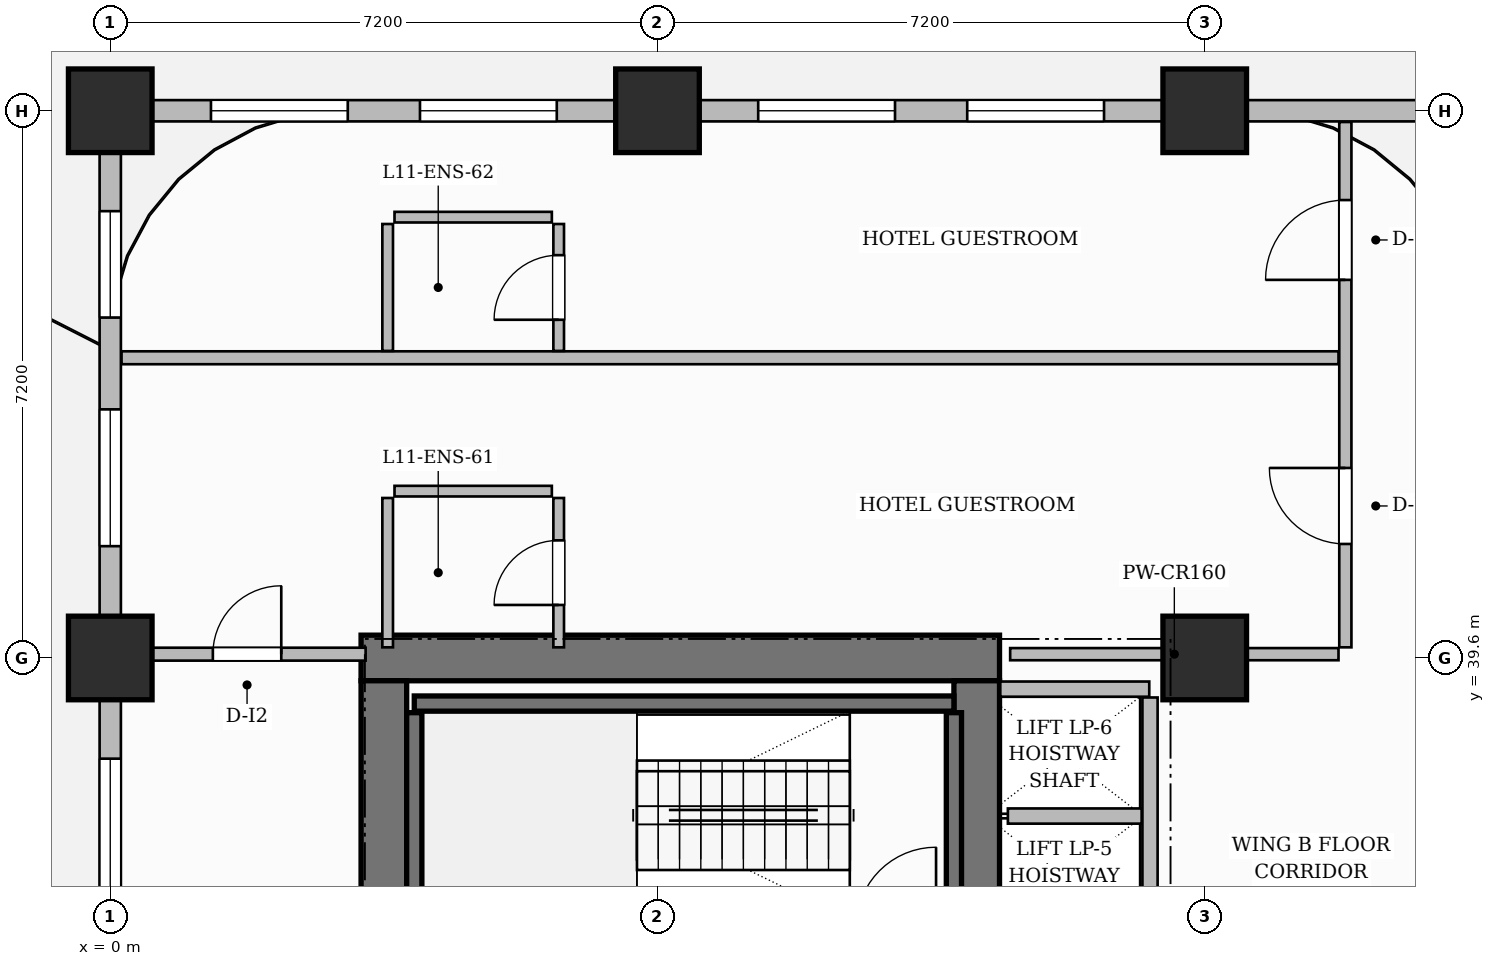
"""IFC4 building model, lengths in metres.
Left out: names, types, materials, properties, quantities, classifications, styles, units other than length and angle.
Written with IfcOpenShell. Run it as: python <this file> out.ifc"""

import sys

from ifc_helpers import new_model, si_unit, direction, frame, frame_2d, origin, origin_2d, place, context, subcontext, project, spatial, rectangle, extrude, source, transform, mapped, element, fill, save


model = new_model("IFC4")
c1 = context("Model", 3, precision=1e-05, world=origin(), true_north=direction((0.0, 1.0)))
c2 = subcontext(c1, "Body", "Model", "MODEL_VIEW")
j1 = project(units=[si_unit("LENGTHUNIT", "METRE"), si_unit("PLANEANGLEUNIT", "RADIAN")], contexts=[c1])
p1 = place(None, origin())
s1 = spatial("IfcSite", under=j1, at=p1, CompositionType="ELEMENT")
p2 = place(p1, origin())
s2 = spatial("IfcBuilding", under=s1, at=p2, CompositionType="ELEMENT")
p3 = place(p2, frame((0.0, 0.0, 50.9)))
s3 = spatial("IfcBuildingStorey", under=s2, at=p3, CompositionType="ELEMENT", Elevation=50.9)
p4 = place(p3, frame((3.3, 39.6, 0.0), z_axis=(0.0, 0.0, 1.0), x_axis=(1.0, 0.0, 0.0)))
e1 = element("IfcWall", 1, at=p4, inside=s3, PredefinedType="SHEAR", context=c2, shape_type="SweptSolid", body=[
    extrude(rectangle(XDim=8.4, YDim=0.6, at=frame_2d((4.2, 0.0))), origin(), (0.0, 0.0, 1.0), 3.7),
])
p5 = place(p3, frame((3.6, 25.5, 0.0), z_axis=(0.0, 0.0, 1.0), x_axis=(0.0, 1.0, 0.0)))
e2 = element("IfcWall", 2, at=p5, inside=s3, PredefinedType="SHEAR", context=c2, shape_type="SweptSolid", body=[
    extrude(rectangle(XDim=13.8, YDim=0.6, at=frame_2d((6.9, 0.0))), origin(), (0.0, 0.0, 1.0), 3.7),
])
p6 = place(p3, frame((11.4, 25.5, 0.0), z_axis=(0.0, 0.0, 1.0), x_axis=(0.0, 1.0, 0.0)))
e3 = element("IfcWall", 3, at=p6, inside=s3, PredefinedType="SHEAR", context=c2, shape_type="SweptSolid", body=[
    extrude(rectangle(XDim=13.8, YDim=0.6, at=frame_2d((6.9, 0.0))), origin(), (0.0, 0.0, 1.0), 3.7),
])
p7 = place(p6, frame((6.47, 0.0, 0.0)))
e4 = element("IfcOpeningElement", 4, at=p7, cuts=e3, PredefinedType="OPENING", context=c2, shape_type="SweptSolid", body=[
    extrude(rectangle(XDim=1.5, YDim=2.2, at=frame_2d((0.75, 1.1))), frame((0.0, 0.31, 0.0), z_axis=(0.0, -1.0, 0.0), x_axis=(1.0, 0.0, 0.0)), (0.0, 0.0, 1.0), 0.62),
])
m1 = source(origin(), c2, "Body", "SweptSolid", [
    extrude(rectangle(XDim=1.1, YDim=1.1, at=origin_2d()), origin(), (0.0, 0.0, 1.0), 3.7),
])
for number, where, z_axis, x_axis in (
    (5, (0.0, 39.6, 0.0), (0.0, 0.0, 1.0), (1.0, 0.0, 0.0)),
    (6, (0.0, 46.8, 0.0), (0.0, 0.0, 1.0), (1.0, 0.0, 0.0)),
    (7, (7.2, 46.8, 0.0), (0.0, 0.0, 1.0), (1.0, 0.0, 0.0)),
    (8, (14.4, 39.6, 0.0), (0.0, 0.0, 1.0), (1.0, 0.0, 0.0)),
    (9, (14.4, 46.8, 0.0), (0.0, 0.0, 1.0), (1.0, 0.0, 0.0)),
):
    element("IfcColumn", number, at=place(p3, frame(where, z_axis=z_axis, x_axis=x_axis)), inside=s3, PredefinedType="COLUMN", context=c2, shape_type="MappedRepresentation", body=[
        mapped(m1, transform((0.0, 0.0, 0.0), scale=1.0)),
    ])
p8 = place(p3, frame((4.0, 39.0, 0.0), z_axis=(0.0, 0.0, 1.0), x_axis=(1.0, 0.0, 0.0)))
e10 = element("IfcWall", 10, at=p8, inside=s3, PredefinedType="SHEAR", context=c2, shape_type="SweptSolid", body=[
    extrude(rectangle(XDim=7.1, YDim=0.2, at=frame_2d((3.55, 0.0))), origin(), (0.0, 0.0, 1.0), 3.7),
])
for number, where, z_axis, x_axis in (
    (11, (4.0, 36.18, 0.0), (0.0, 0.0, 1.0), (0.0, 1.0, 0.0)),
    (12, (11.1, 36.18, 0.0), (0.0, 0.0, 1.0), (0.0, 1.0, 0.0)),
):
    element("IfcWall", number, at=place(p3, frame(where, z_axis=z_axis, x_axis=x_axis)), inside=s3, PredefinedType="SHEAR", context=c2, shape_type="SweptSolid", body=[
        extrude(rectangle(XDim=2.7, YDim=0.2, at=frame_2d((1.35, 0.0))), origin(), (0.0, 0.0, 1.0), 3.7),
    ])
p9 = place(p3, frame((11.71, 39.19, 0.0), z_axis=(0.0, 0.0, 1.0), x_axis=(1.0, 0.0, 0.0)))
e13 = element("IfcWall", 13, at=p9, inside=s3, PredefinedType="PARTITIONING", context=c2, shape_type="SweptSolid", body=[
    extrude(rectangle(XDim=1.96, YDim=0.2, at=frame_2d((0.98, 0.0))), origin(), (0.0, 0.0, 1.0), 3.45),
])
p10 = place(p3, frame((13.68, 34.36, 0.0), z_axis=(0.0, 0.0, 1.0), x_axis=(0.0, 1.0, 0.0)))
e14 = element("IfcWall", 14, at=p10, inside=s3, PredefinedType="PARTITIONING", context=c2, shape_type="SweptSolid", body=[
    extrude(rectangle(XDim=4.72, YDim=0.2, at=frame_2d((2.36, 0.0))), origin(), (0.0, 0.0, 1.0), 3.45),
])
p11 = place(p3, frame((11.81, 37.52, 0.0), z_axis=(0.0, 0.0, 1.0), x_axis=(1.0, 0.0, 0.0)))
e15 = element("IfcWall", 15, at=p11, inside=s3, PredefinedType="PARTITIONING", context=c2, shape_type="SweptSolid", body=[
    extrude(rectangle(XDim=1.76, YDim=0.2, at=frame_2d((0.88, 0.0))), origin(), (0.0, 0.0, 1.0), 3.45),
])
p12 = place(p3, frame((16.25, 39.74, 0.0), z_axis=(0.0, 0.0, 1.0), x_axis=(0.0, 1.0, 0.0)))
e16 = element("IfcWall", 16, at=p12, inside=s3, PredefinedType="PARTITIONING", context=c2, shape_type="SweptSolid", body=[
    extrude(rectangle(XDim=6.912, YDim=0.16, at=frame_2d((3.456, 0.0))), origin(), (0.0, 0.0, 1.0), 3.45),
])
p13 = place(p12, frame((1.36, 0.0, 0.0)))
e17 = element("IfcOpeningElement", 17, at=p13, cuts=e16, PredefinedType="OPENING", context=c2, shape_type="SweptSolid", body=[
    extrude(rectangle(XDim=1.0, YDim=2.2, at=frame_2d((0.5, 1.1))), frame((0.0, 0.09, 0.0), z_axis=(0.0, -1.0, 0.0), x_axis=(1.0, 0.0, 0.0)), (0.0, 0.0, 1.0), 0.18),
])
p14 = place(p12, frame((4.835, 0.0, 0.0)))
e18 = element("IfcOpeningElement", 18, at=p14, cuts=e16, PredefinedType="OPENING", context=c2, shape_type="SweptSolid", body=[
    extrude(rectangle(XDim=1.05, YDim=2.25, at=frame_2d((0.525, 1.125))), frame((0.0, 0.09, 0.0), z_axis=(0.0, -1.0, 0.0), x_axis=(1.0, 0.0, 0.0)), (0.0, 0.0, 1.0), 0.18),
])
p15 = place(p3, frame((11.84, 39.65, 0.0), z_axis=(0.0, 0.0, 1.0), x_axis=(1.0, 0.0, 0.0)))
e19 = element("IfcWall", 19, at=p15, inside=s3, PredefinedType="PARTITIONING", context=c2, shape_type="SweptSolid", body=[
    extrude(rectangle(XDim=4.32, YDim=0.16, at=frame_2d((2.16, 0.0))), origin(), (0.0, 0.0, 1.0), 2.885),
])
p16 = place(p3, frame((0.24, 39.65, 0.0), z_axis=(0.0, 0.0, 1.0), x_axis=(1.0, 0.0, 0.0)))
e20 = element("IfcWall", 20, at=p16, inside=s3, PredefinedType="PARTITIONING", context=c2, shape_type="SweptSolid", body=[
    extrude(rectangle(XDim=3.12, YDim=0.17, at=frame_2d((1.56, 0.0))), origin(), (0.0, 0.0, 1.0), 3.45),
])
p17 = place(p16, frame((1.11, 0.0, 0.0)))
e21 = element("IfcOpeningElement", 21, at=p17, cuts=e20, PredefinedType="OPENING", context=c2, shape_type="SweptSolid", body=[
    extrude(rectangle(XDim=0.9, YDim=2.15, at=frame_2d((0.45, 1.075))), frame((0.0, 0.095, 0.0), z_axis=(0.0, -1.0, 0.0), x_axis=(1.0, 0.0, 0.0)), (0.0, 0.0, 1.0), 0.19),
])
p18 = place(p3, frame((0.148, 43.55, 0.0), z_axis=(0.0, 0.0, 1.0), x_axis=(1.0, 0.0, 0.0)))
e22 = element("IfcWall", 22, at=p18, inside=s3, PredefinedType="PARTITIONING", context=c2, shape_type="SweptSolid", body=[
    extrude(rectangle(XDim=16.012, YDim=0.17, at=frame_2d((8.006, 0.0))), origin(), (0.0, 0.0, 1.0), 3.45),
])
p19 = place(p3, frame((3.65, 39.74, 0.0), z_axis=(0.0, 0.0, 1.0), x_axis=(0.0, 1.0, 0.0)))
e23 = element("IfcWall", 23, at=p19, inside=s3, PredefinedType="PARTITIONING", context=c2, shape_type="SweptSolid", body=[
    extrude(rectangle(XDim=1.965, YDim=0.14, at=frame_2d((0.982, 0.0))), origin(), (0.0, 0.0, 1.0), 3.45),
])
p20 = place(p3, frame((3.74, 41.795, 0.0), z_axis=(0.0, 0.0, 1.0), x_axis=(1.0, 0.0, 0.0)))
e24 = element("IfcWall", 24, at=p20, inside=s3, PredefinedType="PARTITIONING", context=c2, shape_type="SweptSolid", body=[
    extrude(rectangle(XDim=2.07, YDim=0.14, at=frame_2d((1.035, 0.0))), origin(), (0.0, 0.0, 1.0), 2.885),
])
p21 = place(p3, frame((5.9, 39.74, 0.0), z_axis=(0.0, 0.0, 1.0), x_axis=(0.0, 1.0, 0.0)))
e25 = element("IfcWall", 25, at=p21, inside=s3, PredefinedType="PARTITIONING", context=c2, shape_type="SweptSolid", body=[
    extrude(rectangle(XDim=1.965, YDim=0.14, at=frame_2d((0.982, 0.0))), origin(), (0.0, 0.0, 1.0), 3.45),
])
p22 = place(p21, frame((0.558, 0.0, 0.0)))
e26 = element("IfcOpeningElement", 26, at=p22, cuts=e25, PredefinedType="OPENING", context=c2, shape_type="SweptSolid", body=[
    extrude(rectangle(XDim=0.85, YDim=2.1, at=frame_2d((0.425, 1.05))), frame((0.0, 0.08, 0.0), z_axis=(0.0, -1.0, 0.0), x_axis=(1.0, 0.0, 0.0)), (0.0, 0.0, 1.0), 0.16),
])
p23 = place(p3, frame((3.65, 43.64, 0.0), z_axis=(0.0, 0.0, 1.0), x_axis=(0.0, 1.0, 0.0)))
e27 = element("IfcWall", 27, at=p23, inside=s3, PredefinedType="PARTITIONING", context=c2, shape_type="SweptSolid", body=[
    extrude(rectangle(XDim=1.67, YDim=0.14, at=frame_2d((0.835, 0.0))), origin(), (0.0, 0.0, 1.0), 3.45),
])
p24 = place(p3, frame((3.74, 45.4, 0.0), z_axis=(0.0, 0.0, 1.0), x_axis=(1.0, 0.0, 0.0)))
e28 = element("IfcWall", 28, at=p24, inside=s3, PredefinedType="PARTITIONING", context=c2, shape_type="SweptSolid", body=[
    extrude(rectangle(XDim=2.07, YDim=0.14, at=frame_2d((1.035, 0.0))), origin(), (0.0, 0.0, 1.0), 3.45),
])
p25 = place(p3, frame((5.9, 43.64, 0.0), z_axis=(0.0, 0.0, 1.0), x_axis=(0.0, 1.0, 0.0)))
e29 = element("IfcWall", 29, at=p25, inside=s3, PredefinedType="PARTITIONING", context=c2, shape_type="SweptSolid", body=[
    extrude(rectangle(XDim=1.67, YDim=0.14, at=frame_2d((0.835, 0.0))), origin(), (0.0, 0.0, 1.0), 3.45),
])
p26 = place(p25, frame((0.41, 0.0, 0.0)))
e30 = element("IfcOpeningElement", 30, at=p26, cuts=e29, PredefinedType="OPENING", context=c2, shape_type="SweptSolid", body=[
    extrude(rectangle(XDim=0.85, YDim=2.1, at=frame_2d((0.425, 1.05))), frame((0.0, 0.08, 0.0), z_axis=(0.0, -1.0, 0.0), x_axis=(1.0, 0.0, 0.0)), (0.0, 0.0, 1.0), 0.16),
])
p27 = place(p3, frame((0.0, 46.8, 0.0), z_axis=(0.0, 0.0, 1.0), x_axis=(1.0, 0.0, 0.0)))
e31 = element("IfcWall", 31, at=p27, inside=s3, PredefinedType="SOLIDWALL", context=c2, shape_type="SweptSolid", body=[
    extrude(rectangle(XDim=18.0, YDim=0.28, at=frame_2d((9.0, 0.0))), origin(), (0.0, 0.0, 1.0), 2.885),
])
p28 = place(p27, frame((1.325, 0.0, 0.8)))
e32 = element("IfcOpeningElement", 32, at=p28, cuts=e31, PredefinedType="OPENING", context=c2, shape_type="SweptSolid", body=[
    extrude(rectangle(XDim=1.8, YDim=1.85, at=frame_2d((0.9, 0.925))), frame((0.0, 0.15, 0.0), z_axis=(0.0, -1.0, 0.0), x_axis=(1.0, 0.0, 0.0)), (0.0, 0.0, 1.0), 0.3),
])
p29 = place(p27, frame((4.075, 0.0, 0.8)))
e33 = element("IfcOpeningElement", 33, at=p29, cuts=e31, PredefinedType="OPENING", context=c2, shape_type="SweptSolid", body=[
    extrude(rectangle(XDim=1.8, YDim=1.85, at=frame_2d((0.9, 0.925))), frame((0.0, 0.15, 0.0), z_axis=(0.0, -1.0, 0.0), x_axis=(1.0, 0.0, 0.0)), (0.0, 0.0, 1.0), 0.3),
])
p30 = place(p27, frame((8.525, 0.0, 0.8)))
e34 = element("IfcOpeningElement", 34, at=p30, cuts=e31, PredefinedType="OPENING", context=c2, shape_type="SweptSolid", body=[
    extrude(rectangle(XDim=1.8, YDim=1.85, at=frame_2d((0.9, 0.925))), frame((0.0, 0.15, 0.0), z_axis=(0.0, -1.0, 0.0), x_axis=(1.0, 0.0, 0.0)), (0.0, 0.0, 1.0), 0.3),
])
p31 = place(p27, frame((11.275, 0.0, 0.8)))
e35 = element("IfcOpeningElement", 35, at=p31, cuts=e31, PredefinedType="OPENING", context=c2, shape_type="SweptSolid", body=[
    extrude(rectangle(XDim=1.8, YDim=1.85, at=frame_2d((0.9, 0.925))), frame((0.0, 0.15, 0.0), z_axis=(0.0, -1.0, 0.0), x_axis=(1.0, 0.0, 0.0)), (0.0, 0.0, 1.0), 0.3),
])
p32 = place(p3, frame((0.0, 25.25, 0.0), z_axis=(0.0, 0.0, 1.0), x_axis=(0.0, 1.0, 0.0)))
e36 = element("IfcWall", 36, at=p32, inside=s3, PredefinedType="SOLIDWALL", context=c2, shape_type="SweptSolid", body=[
    extrude(rectangle(XDim=21.5, YDim=0.28, at=frame_2d((10.75, 0.0))), origin(), (0.0, 0.0, 1.0), 2.885),
])
p33 = place(p32, frame((1.275, 0.0, 0.8)))
e37 = element("IfcOpeningElement", 37, at=p33, cuts=e36, PredefinedType="OPENING", context=c2, shape_type="SweptSolid", body=[
    extrude(rectangle(XDim=1.8, YDim=1.85, at=frame_2d((0.9, 0.925))), frame((0.0, 0.15, 0.0), z_axis=(0.0, -1.0, 0.0), x_axis=(1.0, 0.0, 0.0)), (0.0, 0.0, 1.0), 0.3),
])
p34 = place(p32, frame((4.025, 0.0, 0.8)))
e38 = element("IfcOpeningElement", 38, at=p34, cuts=e36, PredefinedType="OPENING", context=c2, shape_type="SweptSolid", body=[
    extrude(rectangle(XDim=1.8, YDim=1.85, at=frame_2d((0.9, 0.925))), frame((0.0, 0.15, 0.0), z_axis=(0.0, -1.0, 0.0), x_axis=(1.0, 0.0, 0.0)), (0.0, 0.0, 1.0), 0.3),
])
p35 = place(p32, frame((8.475, 0.0, 0.8)))
e39 = element("IfcOpeningElement", 39, at=p35, cuts=e36, PredefinedType="OPENING", context=c2, shape_type="SweptSolid", body=[
    extrude(rectangle(XDim=1.8, YDim=1.85, at=frame_2d((0.9, 0.925))), frame((0.0, 0.15, 0.0), z_axis=(0.0, -1.0, 0.0), x_axis=(1.0, 0.0, 0.0)), (0.0, 0.0, 1.0), 0.3),
])
p36 = place(p32, frame((11.225, 0.0, 0.8)))
e40 = element("IfcOpeningElement", 40, at=p36, cuts=e36, PredefinedType="OPENING", context=c2, shape_type="SweptSolid", body=[
    extrude(rectangle(XDim=1.8, YDim=1.85, at=frame_2d((0.9, 0.925))), frame((0.0, 0.15, 0.0), z_axis=(0.0, -1.0, 0.0), x_axis=(1.0, 0.0, 0.0)), (0.0, 0.0, 1.0), 0.3),
])
p37 = place(p32, frame((15.821, 0.0, 0.8)))
e41 = element("IfcOpeningElement", 41, at=p37, cuts=e36, PredefinedType="OPENING", context=c2, shape_type="SweptSolid", body=[
    extrude(rectangle(XDim=1.8, YDim=1.85, at=frame_2d((0.9, 0.925))), frame((0.0, 0.15, 0.0), z_axis=(0.0, -1.0, 0.0), x_axis=(1.0, 0.0, 0.0)), (0.0, 0.0, 1.0), 0.3),
])
p38 = place(p32, frame((18.829, 0.0, 0.8)))
e42 = element("IfcOpeningElement", 42, at=p38, cuts=e36, PredefinedType="OPENING", context=c2, shape_type="SweptSolid", body=[
    extrude(rectangle(XDim=1.4, YDim=1.85, at=frame_2d((0.7, 0.925))), frame((0.0, 0.15, 0.0), z_axis=(0.0, -1.0, 0.0), x_axis=(1.0, 0.0, 0.0)), (0.0, 0.0, 1.0), 0.3),
])
m2 = source(origin(), c2, "Body", "SweptSolid", [
    extrude(rectangle(XDim=0.9, YDim=2.15, at=frame_2d((0.45, 1.075))), frame((0.0, 0.025, 0.0), z_axis=(0.0, -1.0, 0.0), x_axis=(1.0, 0.0, 0.0)), (0.0, 0.0, 1.0), 0.05),
])
p39 = place(p17, origin())
e43 = element("IfcDoor", 43, at=p39, inside=s3, OperationType="SINGLE_SWING_RIGHT", PredefinedType="DOOR", context=c2, shape_type="MappedRepresentation", body=[
    mapped(m2, transform((0.0, 0.0, 0.0), scale=1.0)),
])
fill(e21, e43)
m3 = source(origin(), c2, "Body", "SweptSolid", [
    extrude(rectangle(XDim=0.85, YDim=2.1, at=frame_2d((0.425, 1.05))), frame((0.0, 0.025, 0.0), z_axis=(0.0, -1.0, 0.0), x_axis=(1.0, 0.0, 0.0)), (0.0, 0.0, 1.0), 0.05),
])
p40 = place(p22, origin())
e44 = element("IfcDoor", 44, at=p40, inside=s3, OperationType="SINGLE_SWING_LEFT", PredefinedType="DOOR", context=c2, shape_type="MappedRepresentation", body=[
    mapped(m3, transform((0.0, 0.0, 0.0), scale=1.0)),
])
fill(e26, e44)
m4 = source(origin(), c2, "Body", "SweptSolid", [
    extrude(rectangle(XDim=1.0, YDim=2.2, at=frame_2d((0.5, 1.1))), frame((0.0, 0.025, 0.0), z_axis=(0.0, -1.0, 0.0), x_axis=(1.0, 0.0, 0.0)), (0.0, 0.0, 1.0), 0.05),
])
p41 = place(p13, origin())
e45 = element("IfcDoor", 45, at=p41, inside=s3, OperationType="SINGLE_SWING_RIGHT", PredefinedType="DOOR", context=c2, shape_type="MappedRepresentation", body=[
    mapped(m4, transform((0.0, 0.0, 0.0), scale=1.0)),
])
fill(e17, e45)
p42 = place(p26, origin())
e46 = element("IfcDoor", 46, at=p42, inside=s3, OperationType="SINGLE_SWING_LEFT", PredefinedType="DOOR", context=c2, shape_type="MappedRepresentation", body=[
    mapped(m3, transform((0.0, 0.0, 0.0), scale=1.0)),
])
fill(e30, e46)
m5 = source(origin(), c2, "Body", "SweptSolid", [
    extrude(rectangle(XDim=1.05, YDim=2.25, at=frame_2d((0.525, 1.125))), frame((0.0, 0.025, 0.0), z_axis=(0.0, -1.0, 0.0), x_axis=(1.0, 0.0, 0.0)), (0.0, 0.0, 1.0), 0.05),
])
p43 = place(p14, origin())
e47 = element("IfcDoor", 47, at=p43, inside=s3, OperationType="SINGLE_SWING_LEFT", PredefinedType="DOOR", context=c2, shape_type="MappedRepresentation", body=[
    mapped(m5, transform((0.0, 0.0, 0.0), scale=1.0)),
])
fill(e18, e47)
m6 = source(origin(), c2, "Body", "SweptSolid", [
    extrude(rectangle(XDim=1.8, YDim=1.85, at=frame_2d((0.9, 0.925))), frame((0.0, 0.03, 0.0), z_axis=(0.0, -1.0, 0.0), x_axis=(1.0, 0.0, 0.0)), (0.0, 0.0, 1.0), 0.06),
])
p44 = place(p28, origin())
e48 = element("IfcWindow", 48, at=p44, inside=s3, PartitioningType="DOUBLE_PANEL_VERTICAL", PredefinedType="WINDOW", context=c2, shape_type="MappedRepresentation", body=[
    mapped(m6, transform((0.0, 0.0, 0.0), scale=1.0)),
])
fill(e32, e48)
p45 = place(p29, origin())
e49 = element("IfcWindow", 49, at=p45, inside=s3, PartitioningType="DOUBLE_PANEL_VERTICAL", PredefinedType="WINDOW", context=c2, shape_type="MappedRepresentation", body=[
    mapped(m6, transform((0.0, 0.0, 0.0), scale=1.0)),
])
fill(e33, e49)
p46 = place(p30, origin())
e50 = element("IfcWindow", 50, at=p46, inside=s3, PartitioningType="DOUBLE_PANEL_VERTICAL", PredefinedType="WINDOW", context=c2, shape_type="MappedRepresentation", body=[
    mapped(m6, transform((0.0, 0.0, 0.0), scale=1.0)),
])
fill(e34, e50)
p47 = place(p31, origin())
e51 = element("IfcWindow", 51, at=p47, inside=s3, PartitioningType="DOUBLE_PANEL_VERTICAL", PredefinedType="WINDOW", context=c2, shape_type="MappedRepresentation", body=[
    mapped(m6, transform((0.0, 0.0, 0.0), scale=1.0)),
])
fill(e35, e51)
p48 = place(p36, origin())
e52 = element("IfcWindow", 52, at=p48, inside=s3, PartitioningType="DOUBLE_PANEL_VERTICAL", PredefinedType="WINDOW", context=c2, shape_type="MappedRepresentation", body=[
    mapped(m6, transform((0.0, 0.0, 0.0), scale=1.0)),
])
fill(e40, e52)
p49 = place(p37, origin())
e53 = element("IfcWindow", 53, at=p49, inside=s3, PartitioningType="DOUBLE_PANEL_VERTICAL", PredefinedType="WINDOW", context=c2, shape_type="MappedRepresentation", body=[
    mapped(m6, transform((0.0, 0.0, 0.0), scale=1.0)),
])
fill(e41, e53)
m7 = source(origin(), c2, "Body", "SweptSolid", [
    extrude(rectangle(XDim=1.4, YDim=1.85, at=frame_2d((0.7, 0.925))), frame((0.0, 0.03, 0.0), z_axis=(0.0, -1.0, 0.0), x_axis=(1.0, 0.0, 0.0)), (0.0, 0.0, 1.0), 0.06),
])
p50 = place(p38, origin())
e54 = element("IfcWindow", 54, at=p50, inside=s3, PartitioningType="SINGLE_PANEL", PredefinedType="WINDOW", context=c2, shape_type="MappedRepresentation", body=[
    mapped(m7, transform((0.0, 0.0, 0.0), scale=1.0)),
])
fill(e42, e54)
save(model, sys.argv[1])
